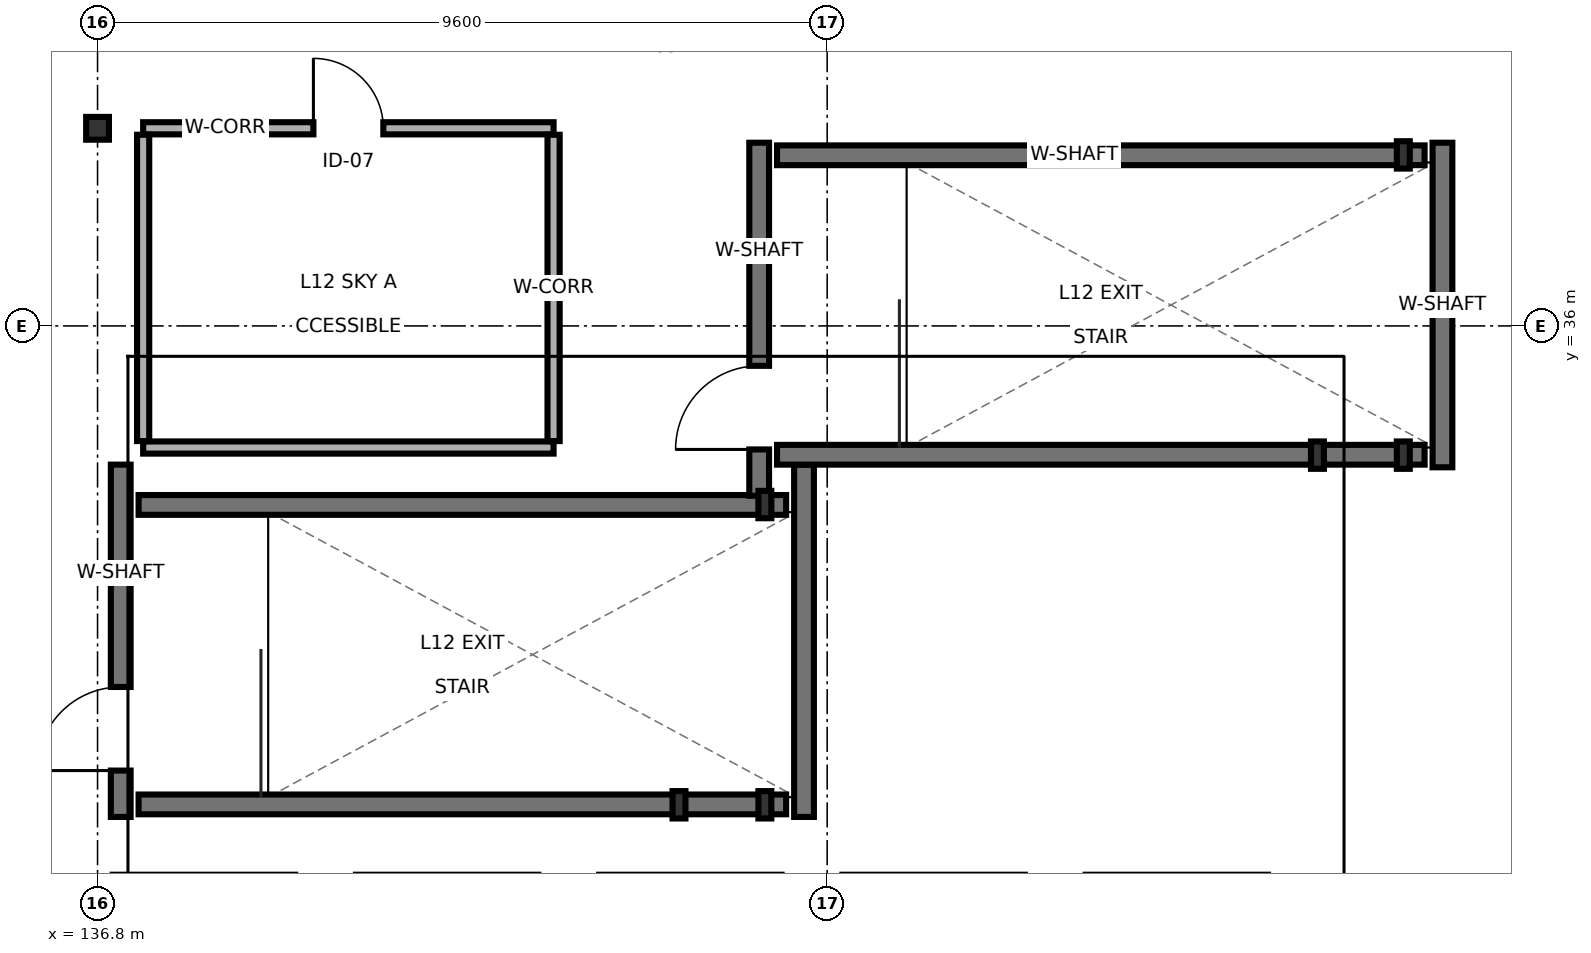
"""IFC4 building model, lengths in metres.
Left out: names, types, materials, properties, quantities, classifications, styles, units other than length and angle.
Written with IfcOpenShell. Run it as: python <this file> out.ifc"""

import sys

from ifc_helpers import new_model, si_unit, direction, frame, frame_2d, origin, origin_2d, place, context, subcontext, project, spatial, rectangle, i_section, extrude, element, fill, save


model = new_model("IFC4")
c1 = context("Model", 3, precision=1e-05, world=origin(), true_north=direction((0.0, 1.0)))
c2 = subcontext(c1, "Body", "Model", "MODEL_VIEW")
j1 = project(units=[si_unit("LENGTHUNIT", "METRE"), si_unit("PLANEANGLEUNIT", "RADIAN")], contexts=[c1])
p1 = place(None, origin())
s1 = spatial("IfcSite", under=j1, at=p1, CompositionType="ELEMENT")
p2 = place(p1, origin())
s2 = spatial("IfcBuilding", under=s1, at=p2, CompositionType="ELEMENT")
p3 = place(p2, frame((0.0, 0.0, 41.9)))
s3 = spatial("IfcBuildingStorey", under=s2, at=p3, CompositionType="ELEMENT", Elevation=41.9)
for number, where, z_axis, x_axis in (
    (1, (144.45, 29.7, 0.0), (0.0, 0.0, 1.0), (1.0, 0.0, 0.0)),
    (2, (145.58, 29.7, 0.0), (0.0, 0.0, 1.0), (1.0, 0.0, 0.0)),
    (3, (145.58, 33.65, 0.0), (0.0, 0.0, 1.0), (1.0, 0.0, 0.0)),
    (4, (152.85, 34.3, 0.0), (0.0, 0.0, 1.0), (1.0, 0.0, 0.0)),
    (5, (153.98, 34.3, 0.0), (0.0, 0.0, 1.0), (1.0, 0.0, 0.0)),
    (6, (153.98, 38.25, 0.0), (0.0, 0.0, 1.0), (1.0, 0.0, 0.0)),
):
    element("IfcColumn", number, at=place(p3, frame(where, z_axis=z_axis, x_axis=x_axis)), inside=s3, PredefinedType="PILASTER", context=c2, shape_type="SweptSolid", body=[
        extrude(i_section(OverallWidth=0.17, OverallDepth=0.36, WebThickness=0.008, FlangeThickness=0.013, FilletRadius=0.018, at=origin_2d()), origin(), (0.0, 0.0, 1.0), 4.2),
    ])
p4 = place(p3, frame((136.8, 38.6, 0.0), z_axis=(0.0, 0.0, 1.0), x_axis=(1.0, 0.0, 0.0)))
e7 = element("IfcColumn", 7, at=p4, inside=s3, PredefinedType="COLUMN", context=c2, shape_type="SweptSolid", body=[
    extrude(i_section(OverallWidth=0.3, OverallDepth=0.3, WebThickness=0.011, FlangeThickness=0.019, FilletRadius=0.027, at=origin_2d()), origin(), (0.0, 0.0, 1.0), 4.2),
])
p5 = place(p3, frame((137.105, 29.54, 0.0), z_axis=(0.0, 0.0, 1.0), x_axis=(0.0, 1.0, 0.0)))
e8 = element("IfcWall", 8, at=p5, inside=s3, PredefinedType="SHEAR", context=c2, shape_type="SweptSolid", body=[
    extrude(rectangle(XDim=4.635, YDim=0.26, at=frame_2d((2.317, 0.0))), origin(), (0.0, 0.0, 1.0), 3.995),
])
p6 = place(p5, frame((0.61, 0.0, 0.0)))
e9 = element("IfcOpeningElement", 9, at=p6, cuts=e8, PredefinedType="OPENING", context=c2, shape_type="SweptSolid", body=[
    extrude(rectangle(XDim=1.1, YDim=2.2, at=frame_2d((0.55, 1.1))), frame((0.0, 0.14, 0.0), z_axis=(0.0, -1.0, 0.0), x_axis=(1.0, 0.0, 0.0)), (0.0, 0.0, 1.0), 0.28),
])
p7 = place(p3, frame((146.095, 29.54, 0.0), z_axis=(0.0, 0.0, 1.0), x_axis=(0.0, 1.0, 0.0)))
e10 = element("IfcWall", 10, at=p7, inside=s3, PredefinedType="SHEAR", context=c2, shape_type="SweptSolid", body=[
    extrude(rectangle(XDim=4.635, YDim=0.26, at=frame_2d((2.317, 0.0))), origin(), (0.0, 0.0, 1.0), 3.995),
])
for number, where, z_axis, x_axis in (
    (11, (137.34, 29.705, 0.0), (0.0, 0.0, 1.0), (1.0, 0.0, 0.0)),
    (12, (137.34, 33.645, 0.0), (0.0, 0.0, 1.0), (1.0, 0.0, 0.0)),
):
    element("IfcWall", number, at=place(p3, frame(where, z_axis=z_axis, x_axis=x_axis)), inside=s3, PredefinedType="SHEAR", context=c2, shape_type="SweptSolid", body=[
        extrude(rectangle(XDim=8.52, YDim=0.26, at=frame_2d((4.26, 0.0))), origin(), (0.0, 0.0, 1.0), 3.995),
    ])
p8 = place(p3, frame((145.505, 33.765, 0.0), z_axis=(0.0, 0.0, 1.0), x_axis=(0.0, 1.0, 0.0)))
e13 = element("IfcWall", 13, at=p8, inside=s3, PredefinedType="SHEAR", context=c2, shape_type="SweptSolid", body=[
    extrude(rectangle(XDim=4.645, YDim=0.26, at=frame_2d((2.323, 0.0))), origin(), (0.0, 0.0, 1.0), 3.995),
])
p9 = place(p8, frame((0.61, 0.0, 0.0)))
e14 = element("IfcOpeningElement", 14, at=p9, cuts=e13, PredefinedType="OPENING", context=c2, shape_type="SweptSolid", body=[
    extrude(rectangle(XDim=1.1, YDim=2.2, at=frame_2d((0.55, 1.1))), frame((0.0, 0.14, 0.0), z_axis=(0.0, -1.0, 0.0), x_axis=(1.0, 0.0, 0.0)), (0.0, 0.0, 1.0), 0.28),
])
p10 = place(p3, frame((154.495, 34.14, 0.0), z_axis=(0.0, 0.0, 1.0), x_axis=(0.0, 1.0, 0.0)))
e15 = element("IfcWall", 15, at=p10, inside=s3, PredefinedType="SHEAR", context=c2, shape_type="SweptSolid", body=[
    extrude(rectangle(XDim=4.27, YDim=0.26, at=frame_2d((2.135, 0.0))), origin(), (0.0, 0.0, 1.0), 3.995),
])
for number, where, z_axis, x_axis in (
    (16, (145.74, 34.305, 0.0), (0.0, 0.0, 1.0), (1.0, 0.0, 0.0)),
    (17, (145.74, 38.245, 0.0), (0.0, 0.0, 1.0), (1.0, 0.0, 0.0)),
):
    element("IfcWall", number, at=place(p3, frame(where, z_axis=z_axis, x_axis=x_axis)), inside=s3, PredefinedType="SHEAR", context=c2, shape_type="SweptSolid", body=[
        extrude(rectangle(XDim=8.52, YDim=0.26, at=frame_2d((4.26, 0.0))), origin(), (0.0, 0.0, 1.0), 3.995),
    ])
p11 = place(p3, frame((137.4, 34.4, 0.0), z_axis=(0.0, 0.0, 1.0), x_axis=(1.0, 0.0, 0.0)))
e18 = element("IfcWall", 18, at=p11, inside=s3, PredefinedType="PARTITIONING", context=c2, shape_type="SweptSolid", body=[
    extrude(rectangle(XDim=5.4, YDim=0.16, at=frame_2d((2.7, 0.0))), origin(), (0.0, 0.0, 1.0), 3.995),
])
p12 = place(p3, frame((137.4, 38.6, 0.0), z_axis=(0.0, 0.0, 1.0), x_axis=(1.0, 0.0, 0.0)))
e19 = element("IfcWall", 19, at=p12, inside=s3, PredefinedType="PARTITIONING", context=c2, shape_type="SweptSolid", body=[
    extrude(rectangle(XDim=5.4, YDim=0.16, at=frame_2d((2.7, 0.0))), origin(), (0.0, 0.0, 1.0), 3.53),
])
p13 = place(p12, frame((2.24, 0.0, 0.0)))
e20 = element("IfcOpeningElement", 20, at=p13, cuts=e19, PredefinedType="OPENING", context=c2, shape_type="SweptSolid", body=[
    extrude(rectangle(XDim=0.92, YDim=2.1, at=frame_2d((0.46, 1.05))), frame((0.0, 0.09, 0.0), z_axis=(0.0, -1.0, 0.0), x_axis=(1.0, 0.0, 0.0)), (0.0, 0.0, 1.0), 0.18),
])
for number, where, z_axis, x_axis in (
    (21, (137.4, 34.485, 0.0), (0.0, 0.0, 1.0), (0.0, 1.0, 0.0)),
    (22, (142.8, 34.485, 0.0), (0.0, 0.0, 1.0), (0.0, 1.0, 0.0)),
):
    element("IfcWall", number, at=place(p3, frame(where, z_axis=z_axis, x_axis=x_axis)), inside=s3, PredefinedType="PARTITIONING", context=c2, shape_type="SweptSolid", body=[
        extrude(rectangle(XDim=4.03, YDim=0.16, at=frame_2d((2.015, 0.0))), origin(), (0.0, 0.0, 1.0), 3.53),
    ])
p14 = place(p6, origin())
e23 = element("IfcDoor", 23, at=p14, inside=s3, OperationType="SINGLE_SWING_LEFT", PredefinedType="DOOR", context=c2, shape_type="SweptSolid", body=[
    extrude(rectangle(XDim=1.1, YDim=2.2, at=frame_2d((0.55, 1.1))), frame((0.0, 0.025, 0.0), z_axis=(0.0, -1.0, 0.0), x_axis=(1.0, 0.0, 0.0)), (0.0, 0.0, 1.0), 0.05),
])
fill(e9, e23)
p15 = place(p9, origin())
e24 = element("IfcDoor", 24, at=p15, inside=s3, OperationType="SINGLE_SWING_LEFT", PredefinedType="DOOR", context=c2, shape_type="SweptSolid", body=[
    extrude(rectangle(XDim=1.1, YDim=2.2, at=frame_2d((0.55, 1.1))), frame((0.0, 0.025, 0.0), z_axis=(0.0, -1.0, 0.0), x_axis=(1.0, 0.0, 0.0)), (0.0, 0.0, 1.0), 0.05),
])
fill(e14, e24)
p16 = place(p13, origin())
e25 = element("IfcDoor", 25, at=p16, inside=s3, OperationType="SINGLE_SWING_LEFT", PredefinedType="DOOR", context=c2, shape_type="SweptSolid", body=[
    extrude(rectangle(XDim=0.92, YDim=2.1, at=frame_2d((0.46, 1.05))), frame((0.0, 0.025, 0.0), z_axis=(0.0, -1.0, 0.0), x_axis=(1.0, 0.0, 0.0)), (0.0, 0.0, 1.0), 0.05),
])
fill(e20, e25)
save(model, sys.argv[1])
